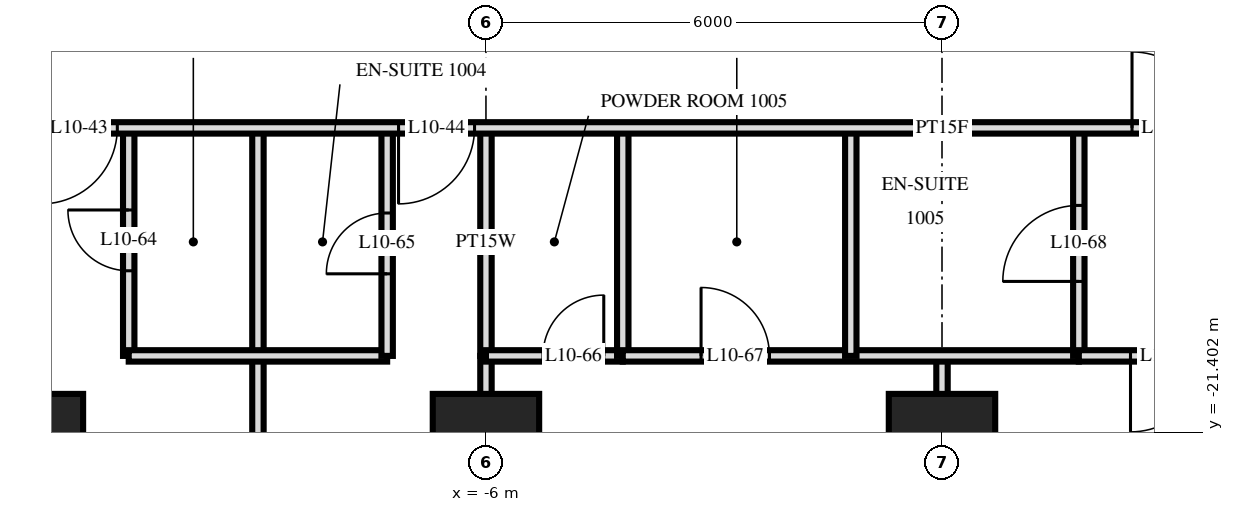
"""IFC4 building model, lengths in metres.
Left out: names, types, materials, properties, quantities, classifications, styles, units other than length and angle.
Written with IfcOpenShell. Run it as: python <this file> out.ifc"""

import sys

from ifc_helpers import new_model, si_unit, direction, frame, frame_2d, origin, origin_2d, place, context, subcontext, project, spatial, rectangle, extrude, element, fill, save


model = new_model("IFC4")
c1 = context("Model", 3, precision=1e-05, world=origin(), true_north=direction((0.0, 1.0)))
c2 = subcontext(c1, "Body", "Model", "MODEL_VIEW")
j1 = project(units=[si_unit("LENGTHUNIT", "METRE"), si_unit("PLANEANGLEUNIT", "RADIAN")], contexts=[c1])
p1 = place(None, origin())
s1 = spatial("IfcSite", under=j1, at=p1, CompositionType="ELEMENT")
p2 = place(p1, origin())
s2 = spatial("IfcBuilding", under=s1, at=p2, CompositionType="ELEMENT")
p3 = place(p2, frame((0.0, 0.0, 45.6)))
s3 = spatial("IfcBuildingStorey", under=s2, at=p3, CompositionType="ELEMENT", Elevation=45.6)
for number, where, z_axis, x_axis in (
    (1, (-12.0, -21.6, 0.0), (0.0, 0.0, 1.0), (1.0, 0.0, 0.0)),
    (2, (-6.0, -21.6, 0.0), (0.0, 0.0, 1.0), (1.0, 0.0, 0.0)),
    (3, (0.0, -21.6, 0.0), (0.0, 0.0, 1.0), (1.0, 0.0, 0.0)),
):
    element("IfcColumn", number, at=place(p3, frame(where, z_axis=z_axis, x_axis=x_axis)), inside=s3, PredefinedType="COLUMN", context=c2, shape_type="SweptSolid", body=[
        extrude(rectangle(XDim=1.4, YDim=1.4, at=origin_2d()), origin(), (0.0, 0.0, 1.0), 3.6),
    ])
p4 = place(p3, frame((1.8, -20.4, 0.0), z_axis=(0.0, 0.0, 1.0), x_axis=(0.0, 1.0, 0.0)))
e4 = element("IfcWall", 4, at=p4, inside=s3, PredefinedType="PARTITIONING", context=c2, shape_type="SweptSolid", body=[
    extrude(rectangle(XDim=3.0, YDim=0.15, at=frame_2d((1.5, 0.0))), origin(), (0.0, 0.0, 1.0), 3.32),
])
p5 = place(p4, frame((0.98, 0.0, 0.0)))
e5 = element("IfcOpeningElement", 5, at=p5, cuts=e4, PredefinedType="OPENING", context=c2, shape_type="SweptSolid", body=[
    extrude(rectangle(XDim=1.0, YDim=2.1, at=frame_2d((0.5, 1.05))), frame((0.0, 0.085, 0.0), z_axis=(0.0, -1.0, 0.0), x_axis=(1.0, 0.0, 0.0)), (0.0, 0.0, 1.0), 0.17),
])
p6 = place(p3, frame((0.0, -29.22, 0.0), z_axis=(0.0, 0.0, 1.0), x_axis=(0.0, 1.0, 0.0)))
e6 = element("IfcWall", 6, at=p6, inside=s3, PredefinedType="PARTITIONING", context=c2, shape_type="SweptSolid", body=[
    extrude(rectangle(XDim=8.82, YDim=0.15, at=frame_2d((4.41, 0.0))), origin(), (0.0, 0.0, 1.0), 3.32),
])
p7 = place(p6, frame((3.89, 0.0, 0.0)))
e7 = element("IfcOpeningElement", 7, at=p7, cuts=e6, PredefinedType="OPENING", context=c2, shape_type="SweptSolid", body=[
    extrude(rectangle(XDim=0.9, YDim=2.1, at=frame_2d((0.45, 1.05))), frame((0.0, 0.085, 0.0), z_axis=(0.0, -1.0, 0.0), x_axis=(1.0, 0.0, 0.0)), (0.0, 0.0, 1.0), 0.17),
])
p8 = place(p3, frame((-1.2, -20.4, 0.0), z_axis=(0.0, 0.0, 1.0), x_axis=(0.0, 1.0, 0.0)))
e8 = element("IfcWall", 8, at=p8, inside=s3, PredefinedType="PARTITIONING", context=c2, shape_type="SweptSolid", body=[
    extrude(rectangle(XDim=3.0, YDim=0.15, at=frame_2d((1.5, 0.0))), origin(), (0.0, 0.0, 1.0), 3.32),
])
p9 = place(p3, frame((-4.2, -20.4, 0.0), z_axis=(0.0, 0.0, 1.0), x_axis=(0.0, 1.0, 0.0)))
e9 = element("IfcWall", 9, at=p9, inside=s3, PredefinedType="PLUMBINGWALL", context=c2, shape_type="SweptSolid", body=[
    extrude(rectangle(XDim=3.0, YDim=0.15, at=frame_2d((1.5, 0.0))), origin(), (0.0, 0.0, 1.0), 3.32),
])
p10 = place(p3, frame((-6.0, -29.22, 0.0), z_axis=(0.0, 0.0, 1.0), x_axis=(0.0, 1.0, 0.0)))
e10 = element("IfcWall", 10, at=p10, inside=s3, PredefinedType="PARTITIONING", context=c2, shape_type="SweptSolid", body=[
    extrude(rectangle(XDim=8.82, YDim=0.15, at=frame_2d((4.41, 0.0))), origin(), (0.0, 0.0, 1.0), 3.32),
])
p11 = place(p3, frame((-6.0, -20.4, 0.0), z_axis=(0.0, 0.0, 1.0), x_axis=(0.0, 1.0, 0.0)))
e11 = element("IfcWall", 11, at=p11, inside=s3, PredefinedType="PLUMBINGWALL", context=c2, shape_type="SweptSolid", body=[
    extrude(rectangle(XDim=3.0, YDim=0.15, at=frame_2d((1.5, 0.0))), origin(), (0.0, 0.0, 1.0), 3.32),
])
p12 = place(p3, frame((-7.3, -20.4, 0.0), z_axis=(0.0, 0.0, 1.0), x_axis=(0.0, 1.0, 0.0)))
e12 = element("IfcWall", 12, at=p12, inside=s3, PredefinedType="PARTITIONING", context=c2, shape_type="SweptSolid", body=[
    extrude(rectangle(XDim=3.0, YDim=0.15, at=frame_2d((1.5, 0.0))), origin(), (0.0, 0.0, 1.0), 3.32),
])
p13 = place(p12, frame((1.08, 0.0, 0.0)))
e13 = element("IfcOpeningElement", 13, at=p13, cuts=e12, PredefinedType="OPENING", context=c2, shape_type="SweptSolid", body=[
    extrude(rectangle(XDim=0.8, YDim=2.1, at=frame_2d((0.4, 1.05))), frame((0.0, 0.085, 0.0), z_axis=(0.0, -1.0, 0.0), x_axis=(1.0, 0.0, 0.0)), (0.0, 0.0, 1.0), 0.17),
])
p14 = place(p3, frame((-9.0, -29.22, 0.0), z_axis=(0.0, 0.0, 1.0), x_axis=(0.0, 1.0, 0.0)))
e14 = element("IfcWall", 14, at=p14, inside=s3, PredefinedType="PARTITIONING", context=c2, shape_type="SweptSolid", body=[
    extrude(rectangle(XDim=11.82, YDim=0.15, at=frame_2d((5.91, 0.0))), origin(), (0.0, 0.0, 1.0), 3.32),
])
p15 = place(p3, frame((-10.7, -20.4, 0.0), z_axis=(0.0, 0.0, 1.0), x_axis=(0.0, 1.0, 0.0)))
e15 = element("IfcWall", 15, at=p15, inside=s3, PredefinedType="PARTITIONING", context=c2, shape_type="SweptSolid", body=[
    extrude(rectangle(XDim=3.0, YDim=0.15, at=frame_2d((1.5, 0.0))), origin(), (0.0, 0.0, 1.0), 3.32),
])
p16 = place(p15, frame((1.12, 0.0, 0.0)))
e16 = element("IfcOpeningElement", 16, at=p16, cuts=e15, PredefinedType="OPENING", context=c2, shape_type="SweptSolid", body=[
    extrude(rectangle(XDim=0.8, YDim=2.1, at=frame_2d((0.4, 1.05))), frame((0.0, 0.085, 0.0), z_axis=(0.0, -1.0, 0.0), x_axis=(1.0, 0.0, 0.0)), (0.0, 0.0, 1.0), 0.17),
])
p17 = place(p3, frame((1.8, -20.4, 0.0), z_axis=(0.0, 0.0, 1.0), x_axis=(1.0, 0.0, 0.0)))
e17 = element("IfcWall", 17, at=p17, inside=s3, PredefinedType="PARTITIONING", context=c2, shape_type="SweptSolid", body=[
    extrude(rectangle(XDim=2.4, YDim=0.15, at=frame_2d((1.2, 0.0))), origin(), (0.0, 0.0, 1.0), 3.32),
])
p18 = place(p17, frame((0.68, 0.0, 0.0)))
e18 = element("IfcOpeningElement", 18, at=p18, cuts=e17, PredefinedType="OPENING", context=c2, shape_type="SweptSolid", body=[
    extrude(rectangle(XDim=1.0, YDim=2.1, at=frame_2d((0.5, 1.05))), frame((0.0, 0.085, 0.0), z_axis=(0.0, -1.0, 0.0), x_axis=(1.0, 0.0, 0.0)), (0.0, 0.0, 1.0), 0.17),
])
p19 = place(p3, frame((-10.7, -20.4, 0.0), z_axis=(0.0, 0.0, 1.0), x_axis=(1.0, 0.0, 0.0)))
e19 = element("IfcWall", 19, at=p19, inside=s3, PredefinedType="PARTITIONING", context=c2, shape_type="SweptSolid", body=[
    extrude(rectangle(XDim=3.4, YDim=0.15, at=frame_2d((1.7, 0.0))), origin(), (0.0, 0.0, 1.0), 3.32),
])
p20 = place(p3, frame((-4.2, -20.4, 0.0), z_axis=(0.0, 0.0, 1.0), x_axis=(1.0, 0.0, 0.0)))
e20 = element("IfcWall", 20, at=p20, inside=s3, PredefinedType="PARTITIONING", context=c2, shape_type="SweptSolid", body=[
    extrude(rectangle(XDim=6.0, YDim=0.15, at=frame_2d((3.0, 0.0))), origin(), (0.0, 0.0, 1.0), 3.32),
])
p21 = place(p20, frame((1.03, 0.0, 0.0)))
e21 = element("IfcOpeningElement", 21, at=p21, cuts=e20, PredefinedType="OPENING", context=c2, shape_type="SweptSolid", body=[
    extrude(rectangle(XDim=0.9, YDim=2.1, at=frame_2d((0.45, 1.05))), frame((0.0, 0.085, 0.0), z_axis=(0.0, -1.0, 0.0), x_axis=(1.0, 0.0, 0.0)), (0.0, 0.0, 1.0), 0.17),
])
p22 = place(p3, frame((-6.0, -20.4, 0.0), z_axis=(0.0, 0.0, 1.0), x_axis=(1.0, 0.0, 0.0)))
e22 = element("IfcWall", 22, at=p22, inside=s3, PredefinedType="PLUMBINGWALL", context=c2, shape_type="SweptSolid", body=[
    extrude(rectangle(XDim=1.8, YDim=0.15, at=frame_2d((0.9, 0.0))), origin(), (0.0, 0.0, 1.0), 3.32),
])
p23 = place(p22, frame((0.75, 0.0, 0.0)))
e23 = element("IfcOpeningElement", 23, at=p23, cuts=e22, PredefinedType="OPENING", context=c2, shape_type="SweptSolid", body=[
    extrude(rectangle(XDim=0.8, YDim=2.1, at=frame_2d((0.4, 1.05))), frame((0.0, 0.085, 0.0), z_axis=(0.0, -1.0, 0.0), x_axis=(1.0, 0.0, 0.0)), (0.0, 0.0, 1.0), 0.17),
])
p24 = place(p3, frame((-33.12, -17.4, 0.0), z_axis=(0.0, 0.0, 1.0), x_axis=(1.0, 0.0, 0.0)))
e24 = element("IfcWall", 24, at=p24, inside=s3, PredefinedType="PARTITIONING", context=c2, shape_type="SweptSolid", body=[
    extrude(rectangle(XDim=66.24, YDim=0.15, at=frame_2d((33.12, 0.0))), origin(), (0.0, 0.0, 1.0), 3.32),
])
p25 = place(p24, frame((9.27, 0.0, 0.0)))
e25 = element("IfcOpeningElement", 25, at=p25, cuts=e24, PredefinedType="OPENING", context=c2, shape_type="SweptSolid", body=[
    extrude(rectangle(XDim=1.0, YDim=2.1, at=frame_2d((0.5, 1.05))), frame((0.0, 0.085, 0.0), z_axis=(0.0, -1.0, 0.0), x_axis=(1.0, 0.0, 0.0)), (0.0, 0.0, 1.0), 0.17),
])
p26 = place(p24, frame((13.97, 0.0, 0.0)))
e26 = element("IfcOpeningElement", 26, at=p26, cuts=e24, PredefinedType="OPENING", context=c2, shape_type="SweptSolid", body=[
    extrude(rectangle(XDim=1.0, YDim=2.1, at=frame_2d((0.5, 1.05))), frame((0.0, 0.085, 0.0), z_axis=(0.0, -1.0, 0.0), x_axis=(1.0, 0.0, 0.0)), (0.0, 0.0, 1.0), 0.17),
])
p27 = place(p24, frame((17.62, 0.0, 0.0)))
e27 = element("IfcOpeningElement", 27, at=p27, cuts=e24, PredefinedType="OPENING", context=c2, shape_type="SweptSolid", body=[
    extrude(rectangle(XDim=1.0, YDim=2.1, at=frame_2d((0.5, 1.05))), frame((0.0, 0.085, 0.0), z_axis=(0.0, -1.0, 0.0), x_axis=(1.0, 0.0, 0.0)), (0.0, 0.0, 1.0), 0.17),
])
p28 = place(p24, frame((21.27, 0.0, 0.0)))
e28 = element("IfcOpeningElement", 28, at=p28, cuts=e24, PredefinedType="OPENING", context=c2, shape_type="SweptSolid", body=[
    extrude(rectangle(XDim=1.0, YDim=2.1, at=frame_2d((0.5, 1.05))), frame((0.0, 0.085, 0.0), z_axis=(0.0, -1.0, 0.0), x_axis=(1.0, 0.0, 0.0)), (0.0, 0.0, 1.0), 0.17),
])
p29 = place(p24, frame((25.97, 0.0, 0.0)))
e29 = element("IfcOpeningElement", 29, at=p29, cuts=e24, PredefinedType="OPENING", context=c2, shape_type="SweptSolid", body=[
    extrude(rectangle(XDim=1.0, YDim=2.1, at=frame_2d((0.5, 1.05))), frame((0.0, 0.085, 0.0), z_axis=(0.0, -1.0, 0.0), x_axis=(1.0, 0.0, 0.0)), (0.0, 0.0, 1.0), 0.17),
])
p30 = place(p24, frame((35.62, 0.0, 0.0)))
e30 = element("IfcOpeningElement", 30, at=p30, cuts=e24, PredefinedType="OPENING", context=c2, shape_type="SweptSolid", body=[
    extrude(rectangle(XDim=1.0, YDim=2.1, at=frame_2d((0.5, 1.05))), frame((0.0, 0.085, 0.0), z_axis=(0.0, -1.0, 0.0), x_axis=(1.0, 0.0, 0.0)), (0.0, 0.0, 1.0), 0.17),
])
p31 = place(p24, frame((40.97, 0.0, 0.0)))
e31 = element("IfcOpeningElement", 31, at=p31, cuts=e24, PredefinedType="OPENING", context=c2, shape_type="SweptSolid", body=[
    extrude(rectangle(XDim=1.0, YDim=2.1, at=frame_2d((0.5, 1.05))), frame((0.0, 0.085, 0.0), z_axis=(0.0, -1.0, 0.0), x_axis=(1.0, 0.0, 0.0)), (0.0, 0.0, 1.0), 0.17),
])
p32 = place(p24, frame((42.27, 0.0, 0.0)))
e32 = element("IfcOpeningElement", 32, at=p32, cuts=e24, PredefinedType="OPENING", context=c2, shape_type="SweptSolid", body=[
    extrude(rectangle(XDim=1.0, YDim=2.1, at=frame_2d((0.5, 1.05))), frame((0.0, 0.085, 0.0), z_axis=(0.0, -1.0, 0.0), x_axis=(1.0, 0.0, 0.0)), (0.0, 0.0, 1.0), 0.17),
])
p33 = place(p24, frame((49.72, 0.0, 0.0)))
e33 = element("IfcOpeningElement", 33, at=p33, cuts=e24, PredefinedType="OPENING", context=c2, shape_type="SweptSolid", body=[
    extrude(rectangle(XDim=1.0, YDim=2.1, at=frame_2d((0.5, 1.05))), frame((0.0, 0.085, 0.0), z_axis=(0.0, -1.0, 0.0), x_axis=(1.0, 0.0, 0.0)), (0.0, 0.0, 1.0), 0.17),
])
p34 = place(p24, frame((51.27, 0.0, 0.0)))
e34 = element("IfcOpeningElement", 34, at=p34, cuts=e24, PredefinedType="OPENING", context=c2, shape_type="SweptSolid", body=[
    extrude(rectangle(XDim=1.0, YDim=2.1, at=frame_2d((0.5, 1.05))), frame((0.0, 0.085, 0.0), z_axis=(0.0, -1.0, 0.0), x_axis=(1.0, 0.0, 0.0)), (0.0, 0.0, 1.0), 0.17),
])
p35 = place(p24, frame((4.42, 0.0, 0.0)))
e35 = element("IfcOpeningElement", 35, at=p35, cuts=e24, PredefinedType="OPENING", context=c2, shape_type="SweptSolid", body=[
    extrude(rectangle(XDim=1.0, YDim=2.1, at=frame_2d((0.5, 1.05))), frame((0.0, 0.085, 0.0), z_axis=(0.0, -1.0, 0.0), x_axis=(1.0, 0.0, 0.0)), (0.0, 0.0, 1.0), 0.17),
])
p36 = place(p24, frame((54.82, 0.0, 0.0)))
e36 = element("IfcOpeningElement", 36, at=p36, cuts=e24, PredefinedType="OPENING", context=c2, shape_type="SweptSolid", body=[
    extrude(rectangle(XDim=1.0, YDim=2.1, at=frame_2d((0.5, 1.05))), frame((0.0, 0.085, 0.0), z_axis=(0.0, -1.0, 0.0), x_axis=(1.0, 0.0, 0.0)), (0.0, 0.0, 1.0), 0.17),
])
p37 = place(p28, frame((0.5, 0.0, 0.0), z_axis=(0.0, 0.0, 1.0), x_axis=(-1.0, 0.0, 0.0)))
e37 = element("IfcDoor", 37, at=p37, inside=s3, OperationType="SINGLE_SWING_LEFT", PredefinedType="DOOR", context=c2, shape_type="SweptSolid", body=[
    extrude(rectangle(XDim=1.0, YDim=2.1, at=frame_2d((0.0, 1.05))), frame((0.0, -0.025, 0.0), z_axis=(0.0, 1.0, 0.0), x_axis=(-1.0, 0.0, 0.0)), (0.0, 0.0, 1.0), 0.05),
])
fill(e28, e37)
p38 = place(p29, frame((0.5, 0.0, 0.0), z_axis=(0.0, 0.0, 1.0), x_axis=(-1.0, 0.0, 0.0)))
e38 = element("IfcDoor", 38, at=p38, inside=s3, OperationType="SINGLE_SWING_LEFT", PredefinedType="DOOR", context=c2, shape_type="SweptSolid", body=[
    extrude(rectangle(XDim=1.0, YDim=2.1, at=frame_2d((0.0, 1.05))), frame((0.0, -0.025, 0.0), z_axis=(0.0, 1.0, 0.0), x_axis=(-1.0, 0.0, 0.0)), (0.0, 0.0, 1.0), 0.05),
])
fill(e29, e38)
p39 = place(p30, origin())
e39 = element("IfcDoor", 39, at=p39, inside=s3, OperationType="SINGLE_SWING_RIGHT", PredefinedType="DOOR", context=c2, shape_type="SweptSolid", body=[
    extrude(rectangle(XDim=1.0, YDim=2.1, at=frame_2d((0.5, 1.05))), frame((0.0, 0.025, 0.0), z_axis=(0.0, -1.0, 0.0), x_axis=(1.0, 0.0, 0.0)), (0.0, 0.0, 1.0), 0.05),
])
fill(e30, e39)
p40 = place(p16, origin())
e40 = element("IfcDoor", 40, at=p40, inside=s3, OperationType="SINGLE_SWING_LEFT", PredefinedType="DOOR", context=c2, shape_type="SweptSolid", body=[
    extrude(rectangle(XDim=0.8, YDim=2.1, at=frame_2d((0.4, 1.05))), frame((0.0, 0.025, 0.0), z_axis=(0.0, -1.0, 0.0), x_axis=(1.0, 0.0, 0.0)), (0.0, 0.0, 1.0), 0.05),
])
fill(e16, e40)
p41 = place(p13, origin())
e41 = element("IfcDoor", 41, at=p41, inside=s3, OperationType="SINGLE_SWING_RIGHT", PredefinedType="DOOR", context=c2, shape_type="SweptSolid", body=[
    extrude(rectangle(XDim=0.8, YDim=2.1, at=frame_2d((0.4, 1.05))), frame((0.0, 0.025, 0.0), z_axis=(0.0, -1.0, 0.0), x_axis=(1.0, 0.0, 0.0)), (0.0, 0.0, 1.0), 0.05),
])
fill(e13, e41)
p42 = place(p23, origin())
e42 = element("IfcDoor", 42, at=p42, inside=s3, OperationType="SINGLE_SWING_LEFT", PredefinedType="DOOR", context=c2, shape_type="SweptSolid", body=[
    extrude(rectangle(XDim=0.8, YDim=2.1, at=frame_2d((0.4, 1.05))), frame((0.0, 0.025, 0.0), z_axis=(0.0, -1.0, 0.0), x_axis=(1.0, 0.0, 0.0)), (0.0, 0.0, 1.0), 0.05),
])
fill(e23, e42)
p43 = place(p21, origin())
e43 = element("IfcDoor", 43, at=p43, inside=s3, OperationType="SINGLE_SWING_RIGHT", PredefinedType="DOOR", context=c2, shape_type="SweptSolid", body=[
    extrude(rectangle(XDim=0.9, YDim=2.1, at=frame_2d((0.45, 1.05))), frame((0.0, 0.025, 0.0), z_axis=(0.0, -1.0, 0.0), x_axis=(1.0, 0.0, 0.0)), (0.0, 0.0, 1.0), 0.05),
])
fill(e21, e43)
p44 = place(p5, origin())
e44 = element("IfcDoor", 44, at=p44, inside=s3, OperationType="SINGLE_SWING_RIGHT", PredefinedType="DOOR", context=c2, shape_type="SweptSolid", body=[
    extrude(rectangle(XDim=1.0, YDim=2.1, at=frame_2d((0.5, 1.05))), frame((0.0, 0.025, 0.0), z_axis=(0.0, -1.0, 0.0), x_axis=(1.0, 0.0, 0.0)), (0.0, 0.0, 1.0), 0.05),
])
fill(e5, e44)
p45 = place(p18, frame((0.5, 0.0, 0.0), z_axis=(0.0, 0.0, 1.0), x_axis=(-1.0, 0.0, 0.0)))
e45 = element("IfcDoor", 45, at=p45, inside=s3, OperationType="SINGLE_SWING_LEFT", PredefinedType="DOOR", context=c2, shape_type="SweptSolid", body=[
    extrude(rectangle(XDim=1.0, YDim=2.1, at=frame_2d((0.0, 1.05))), frame((0.0, -0.025, 0.0), z_axis=(0.0, 1.0, 0.0), x_axis=(-1.0, 0.0, 0.0)), (0.0, 0.0, 1.0), 0.05),
])
fill(e18, e45)
save(model, sys.argv[1])
